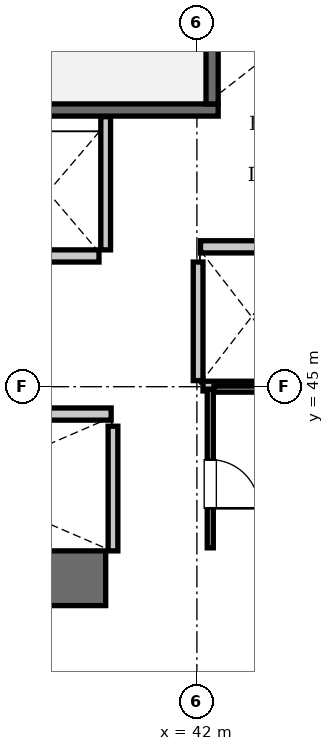
"""IFC4 building model, lengths in metres.
Left out: names, types, materials, properties, quantities, classifications, styles, units other than length and angle.
Written with IfcOpenShell. Run it as: python <this file> out.ifc"""

import sys

from ifc_helpers import new_model, si_unit, direction, frame, frame_2d, origin, place, context, subcontext, project, spatial, rectangle, extrude, element, fill, save


model = new_model("IFC4")
c1 = context("Model", 3, precision=1e-05, world=origin(), true_north=direction((0.0, 1.0)))
c2 = subcontext(c1, "Body", "Model", "MODEL_VIEW")
j1 = project(units=[si_unit("LENGTHUNIT", "METRE"), si_unit("PLANEANGLEUNIT", "RADIAN")], contexts=[c1])
p1 = place(None, origin())
s1 = spatial("IfcSite", under=j1, at=p1, CompositionType="ELEMENT")
p2 = place(p1, origin())
s2 = spatial("IfcBuilding", under=s1, at=p2, CompositionType="ELEMENT")
p3 = place(p2, frame((0.0, 0.0, 69.3)))
s3 = spatial("IfcBuildingStorey", under=s2, at=p3, CompositionType="ELEMENT", Elevation=69.3)
p4 = place(p3, frame((35.1, 41.85, 0.0), z_axis=(0.0, 0.0, 1.0), x_axis=(1.0, 0.0, 0.0)))
e1 = element("IfcWall", 1, at=p4, inside=s3, PredefinedType="SHEAR", context=c2, shape_type="SweptSolid", body=[
    extrude(rectangle(XDim=5.4, YDim=0.9, at=frame_2d((2.7, 0.0))), origin(), (0.0, 0.0, 1.0), 3.85),
])
p5 = place(p3, frame((33.25, 49.55, 0.0), z_axis=(0.0, 0.0, 1.0), x_axis=(1.0, 0.0, 0.0)))
e2 = element("IfcWall", 2, at=p5, inside=s3, PredefinedType="SOLIDWALL", context=c2, shape_type="SweptSolid", body=[
    extrude(rectangle(XDim=9.1, YDim=0.2, at=frame_2d((4.55, 0.0))), origin(), (0.0, 0.0, 1.0), 3.61),
])
p6 = place(p3, frame((42.25, 49.65, 0.0), z_axis=(0.0, 0.0, 1.0), x_axis=(0.0, 1.0, 0.0)))
e3 = element("IfcWall", 3, at=p6, inside=s3, PredefinedType="SOLIDWALL", context=c2, shape_type="SweptSolid", body=[
    extrude(rectangle(XDim=3.45, YDim=0.2, at=frame_2d((1.725, 0.0))), origin(), (0.0, 0.0, 1.0), 3.61),
])
p7 = place(p3, frame((42.06, 47.3, 0.0), z_axis=(0.0, 0.0, 1.0), x_axis=(1.0, 0.0, 0.0)))
e4 = element("IfcWall", 4, at=p7, inside=s3, PredefinedType="SOLIDWALL", context=c2, shape_type="SweptSolid", body=[
    extrude(rectangle(XDim=1.68, YDim=0.2, at=frame_2d((0.84, 0.0))), origin(), (0.0, 0.0, 1.0), 3.61),
])
p8 = place(p3, frame((38.91, 44.55, 0.0), z_axis=(0.0, 0.0, 1.0), x_axis=(1.0, 0.0, 0.0)))
e5 = element("IfcWall", 5, at=p8, inside=s3, PredefinedType="SOLIDWALL", context=c2, shape_type="SweptSolid", body=[
    extrude(rectangle(XDim=1.68, YDim=0.2, at=frame_2d((0.84, 0.0))), origin(), (0.0, 0.0, 1.0), 3.61),
])
p9 = place(p3, frame((38.71, 47.15, 0.0), z_axis=(0.0, 0.0, 1.0), x_axis=(1.0, 0.0, 0.0)))
e6 = element("IfcWall", 6, at=p9, inside=s3, PredefinedType="SOLIDWALL", context=c2, shape_type="SweptSolid", body=[
    extrude(rectangle(XDim=1.68, YDim=0.2, at=frame_2d((0.84, 0.0))), origin(), (0.0, 0.0, 1.0), 3.61),
])
p10 = place(p3, frame((42.02, 45.1, 0.0), z_axis=(0.0, 0.0, 1.0), x_axis=(0.0, 1.0, 0.0)))
e7 = element("IfcWall", 7, at=p10, inside=s3, PredefinedType="SOLIDWALL", context=c2, shape_type="SweptSolid", body=[
    extrude(rectangle(XDim=1.95, YDim=0.16, at=frame_2d((0.975, 0.0))), origin(), (0.0, 0.0, 1.0), 3.61),
])
p11 = place(p3, frame((42.1, 45.01, 0.0), z_axis=(0.0, 0.0, 1.0), x_axis=(1.0, 0.0, 0.0)))
e8 = element("IfcWall", 8, at=p11, inside=s3, PredefinedType="SOLIDWALL", context=c2, shape_type="SweptSolid", body=[
    extrude(rectangle(XDim=3.45, YDim=0.16, at=frame_2d((1.725, 0.0))), origin(), (0.0, 0.0, 1.0), 3.61),
])
p12 = place(p3, frame((40.62, 42.3, 0.0), z_axis=(0.0, 0.0, 1.0), x_axis=(0.0, 1.0, 0.0)))
e9 = element("IfcWall", 9, at=p12, inside=s3, PredefinedType="SOLIDWALL", context=c2, shape_type="SweptSolid", body=[
    extrude(rectangle(XDim=2.05, YDim=0.16, at=frame_2d((1.025, 0.0))), origin(), (0.0, 0.0, 1.0), 3.61),
])
p13 = place(p3, frame((40.5, 47.25, 0.0), z_axis=(0.0, 0.0, 1.0), x_axis=(0.0, 1.0, 0.0)))
e10 = element("IfcWall", 10, at=p13, inside=s3, PredefinedType="SOLIDWALL", context=c2, shape_type="SweptSolid", body=[
    extrude(rectangle(XDim=2.19, YDim=0.16, at=frame_2d((1.095, 0.0))), origin(), (0.0, 0.0, 1.0), 3.61),
])
p14 = place(p3, frame((42.22, 42.35, 0.0), z_axis=(0.0, 0.0, 1.0), x_axis=(0.0, 1.0, 0.0)))
e11 = element("IfcWall", 11, at=p14, inside=s3, PredefinedType="PARTITIONING", context=c2, shape_type="SweptSolid", body=[
    extrude(rectangle(XDim=2.61, YDim=0.1, at=frame_2d((1.305, 0.0))), origin(), (0.0, 0.0, 1.0), 3.61),
])
p15 = place(p14, frame((0.65, 0.0, 0.0)))
e12 = element("IfcOpeningElement", 12, at=p15, cuts=e11, PredefinedType="OPENING", context=c2, shape_type="SweptSolid", body=[
    extrude(rectangle(XDim=0.8, YDim=2.05, at=frame_2d((0.4, 1.025))), frame((0.0, 0.06, 0.0), z_axis=(0.0, -1.0, 0.0), x_axis=(1.0, 0.0, 0.0)), (0.0, 0.0, 1.0), 0.12),
])
p16 = place(p3, frame((42.28, 44.96, 0.0), z_axis=(0.0, 0.0, 1.0), x_axis=(1.0, 0.0, 0.0)))
e13 = element("IfcWall", 13, at=p16, inside=s3, PredefinedType="PARTITIONING", context=c2, shape_type="SweptSolid", body=[
    extrude(rectangle(XDim=1.3, YDim=0.1, at=frame_2d((0.65, 0.0))), origin(), (0.0, 0.0, 1.0), 3.61),
])
p17 = place(p15, frame((0.8, 0.0, 0.0), z_axis=(0.0, 0.0, 1.0), x_axis=(-1.0, 0.0, 0.0)))
e14 = element("IfcDoor", 14, at=p17, inside=s3, OperationType="SINGLE_SWING_RIGHT", PredefinedType="DOOR", context=c2, shape_type="SweptSolid", body=[
    extrude(rectangle(XDim=0.8, YDim=2.05, at=frame_2d((0.4, 1.025))), frame((0.0, 0.025, 0.0), z_axis=(0.0, -1.0, 0.0), x_axis=(1.0, 0.0, 0.0)), (0.0, 0.0, 1.0), 0.05),
])
fill(e12, e14)
save(model, sys.argv[1])
